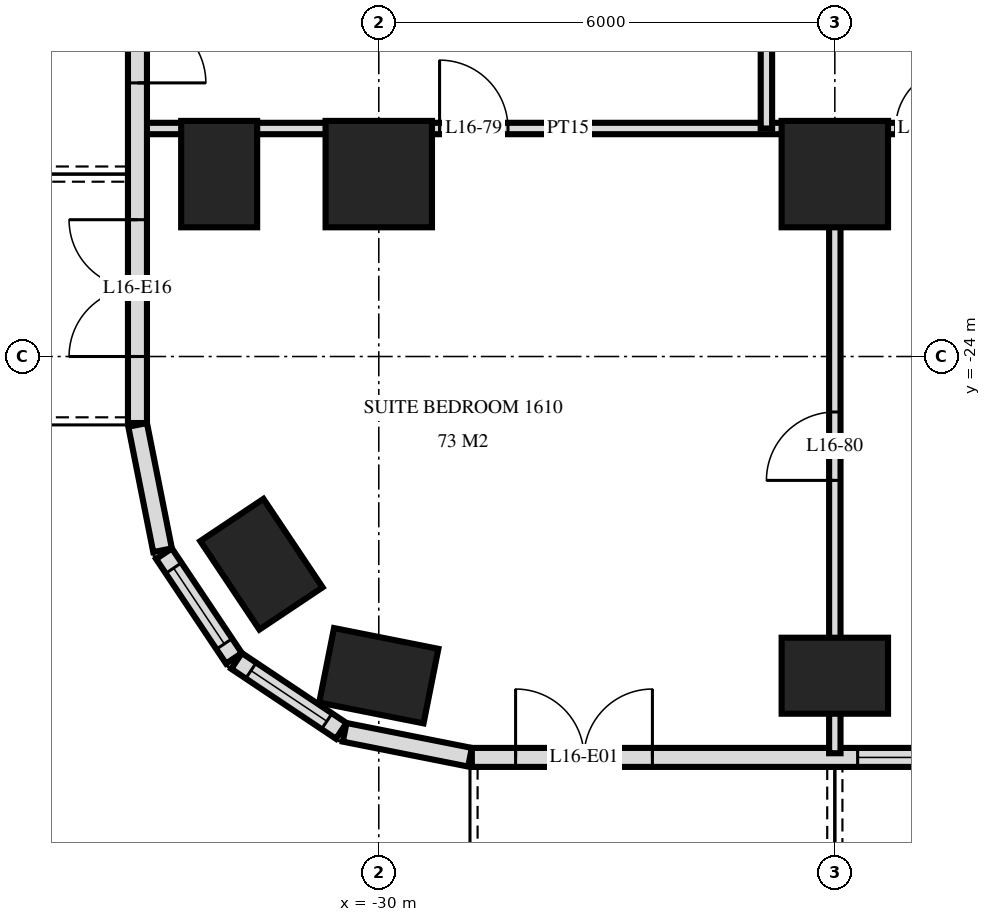
"""IFC4 building model, lengths in metres.
Left out: names, types, materials, properties, quantities, classifications, styles, units other than length and angle.
Written with IfcOpenShell. Run it as: python <this file> out.ifc"""

import sys

from ifc_helpers import new_model, si_unit, direction, frame, frame_2d, origin, origin_2d, place, context, subcontext, project, spatial, rectangle, extrude, element, fill, save


model = new_model("IFC4")
c1 = context("Model", 3, precision=1e-05, world=origin(), true_north=direction((0.0, 1.0)))
c2 = subcontext(c1, "Body", "Model", "MODEL_VIEW")
j1 = project(units=[si_unit("LENGTHUNIT", "METRE"), si_unit("PLANEANGLEUNIT", "RADIAN")], contexts=[c1])
p1 = place(None, origin())
s1 = spatial("IfcSite", under=j1, at=p1, CompositionType="ELEMENT")
p2 = place(p1, origin())
s2 = spatial("IfcBuilding", under=s1, at=p2, CompositionType="ELEMENT")
p3 = place(p2, frame((0.0, 0.0, 67.2)))
s3 = spatial("IfcBuildingStorey", under=s2, at=p3, CompositionType="ELEMENT", Elevation=67.2)
for number, where, z_axis, x_axis in (
    (1, (-32.1, -21.6, 0.0), (0.0, 0.0, 1.0), (0.0, 1.0, 0.0)),
    (2, (-31.544, -26.733, 0.0), (0.0, 0.0, 1.0), (-0.556, 0.831, 0.0)),
    (3, (-30.0, -28.2, 0.0), (0.0, 0.0, 1.0), (-0.981, 0.195, 0.0)),
):
    element("IfcColumn", number, at=place(p3, frame(where, z_axis=z_axis, x_axis=x_axis)), inside=s3, PredefinedType="COLUMN", context=c2, shape_type="SweptSolid", body=[
        extrude(rectangle(XDim=1.4, YDim=1.0, at=origin_2d()), origin(), (0.0, 0.0, 1.0), 3.6),
    ])
p4 = place(p3, frame((-30.0, -21.6, 0.0), z_axis=(0.0, 0.0, 1.0), x_axis=(1.0, 0.0, 0.0)))
e4 = element("IfcColumn", 4, at=p4, inside=s3, PredefinedType="COLUMN", context=c2, shape_type="SweptSolid", body=[
    extrude(rectangle(XDim=1.4, YDim=1.4, at=origin_2d()), origin(), (0.0, 0.0, 1.0), 3.6),
])
p5 = place(p3, frame((-24.0, -28.2, 0.0), z_axis=(0.0, 0.0, 1.0), x_axis=(1.0, 0.0, 0.0)))
e5 = element("IfcColumn", 5, at=p5, inside=s3, PredefinedType="COLUMN", context=c2, shape_type="SweptSolid", body=[
    extrude(rectangle(XDim=1.4, YDim=1.0, at=origin_2d()), origin(), (0.0, 0.0, 1.0), 3.6),
])
p6 = place(p3, frame((-24.0, -21.6, 0.0), z_axis=(0.0, 0.0, 1.0), x_axis=(1.0, 0.0, 0.0)))
e6 = element("IfcColumn", 6, at=p6, inside=s3, PredefinedType="COLUMN", context=c2, shape_type="SweptSolid", body=[
    extrude(rectangle(XDim=1.4, YDim=1.4, at=origin_2d()), origin(), (0.0, 0.0, 1.0), 3.6),
])
p7 = place(p3, frame((-33.175, -3.325, 0.0), z_axis=(0.0, 0.0, 1.0), x_axis=(0.0, -1.0, 0.0)))
e7 = element("IfcWall", 7, at=p7, inside=s3, PredefinedType="SOLIDWALL", context=c2, shape_type="SweptSolid", body=[
    extrude(rectangle(XDim=21.551, YDim=0.25, at=frame_2d((10.775, 0.0))), origin(), (0.0, 0.0, 1.0), 3.32),
])
p8 = place(p7, frame((6.65, 0.0, 0.0)))
e8 = element("IfcOpeningElement", 8, at=p8, cuts=e7, PredefinedType="OPENING", context=c2, shape_type="SweptSolid", body=[
    extrude(rectangle(XDim=1.8, YDim=2.4, at=frame_2d((0.9, 1.2))), frame((0.0, 0.135, 0.0), z_axis=(0.0, -1.0, 0.0), x_axis=(1.0, 0.0, 0.0)), (0.0, 0.0, 1.0), 0.27),
])
p9 = place(p7, frame((12.575, 0.0, 0.3)))
e9 = element("IfcOpeningElement", 9, at=p9, cuts=e7, PredefinedType="OPENING", context=c2, shape_type="SweptSolid", body=[
    extrude(rectangle(XDim=1.2, YDim=2.1, at=frame_2d((0.6, 1.05))), frame((0.0, 0.135, 0.0), z_axis=(0.0, -1.0, 0.0), x_axis=(1.0, 0.0, 0.0)), (0.0, 0.0, 1.0), 0.27),
])
p10 = place(p7, frame((15.275, 0.0, 0.0)))
e10 = element("IfcOpeningElement", 10, at=p10, cuts=e7, PredefinedType="OPENING", context=c2, shape_type="SweptSolid", body=[
    extrude(rectangle(XDim=1.8, YDim=2.4, at=frame_2d((0.9, 1.2))), frame((0.0, 0.135, 0.0), z_axis=(0.0, -1.0, 0.0), x_axis=(1.0, 0.0, 0.0)), (0.0, 0.0, 1.0), 0.27),
])
p11 = place(p7, frame((18.875, 0.0, 0.0)))
e11 = element("IfcOpeningElement", 11, at=p11, cuts=e7, PredefinedType="OPENING", context=c2, shape_type="SweptSolid", body=[
    extrude(rectangle(XDim=1.8, YDim=2.4, at=frame_2d((0.9, 1.2))), frame((0.0, 0.135, 0.0), z_axis=(0.0, -1.0, 0.0), x_axis=(1.0, 0.0, 0.0)), (0.0, 0.0, 1.0), 0.27),
])
p12 = place(p3, frame((-33.173, -24.9, 0.0), z_axis=(0.0, 0.0, 1.0), x_axis=(0.195166572128, -0.980770110232, 0.0)))
e12 = element("IfcWall", 12, at=p12, inside=s3, PredefinedType="SOLIDWALL", context=c2, shape_type="SweptSolid", body=[
    extrude(rectangle(XDim=1.681, YDim=0.25, at=frame_2d((0.841, 0.0))), origin(), (0.0, 0.0, 1.0), 3.32),
])
p13 = place(p3, frame((-32.826, -26.594, 0.0), z_axis=(0.0, 0.0, 1.0), x_axis=(0.55555029066, -0.831482937015, 0.0)))
e13 = element("IfcWall", 13, at=p13, inside=s3, PredefinedType="SOLIDWALL", context=c2, shape_type="SweptSolid", body=[
    extrude(rectangle(XDim=1.656, YDim=0.25, at=frame_2d((0.828, 0.0))), origin(), (0.0, 0.0, 1.0), 3.32),
])
p14 = place(p13, frame((0.228, 0.0, 0.9)))
e14 = element("IfcOpeningElement", 14, at=p14, cuts=e13, PredefinedType="OPENING", context=c2, shape_type="SweptSolid", body=[
    extrude(rectangle(XDim=1.2, YDim=1.5, at=frame_2d((0.6, 0.75))), frame((0.0, 0.135, 0.0), z_axis=(0.0, -1.0, 0.0), x_axis=(1.0, 0.0, 0.0)), (0.0, 0.0, 1.0), 0.27),
])
p15 = place(p3, frame((-31.871, -28.006, 0.0), z_axis=(0.0, 0.0, 1.0), x_axis=(0.831482937015, -0.55555029066, 0.0)))
e15 = element("IfcWall", 15, at=p15, inside=s3, PredefinedType="SOLIDWALL", context=c2, shape_type="SweptSolid", body=[
    extrude(rectangle(XDim=1.656, YDim=0.25, at=frame_2d((0.828, 0.0))), origin(), (0.0, 0.0, 1.0), 3.32),
])
p16 = place(p15, frame((0.228, 0.0, 0.9)))
e16 = element("IfcOpeningElement", 16, at=p16, cuts=e15, PredefinedType="OPENING", context=c2, shape_type="SweptSolid", body=[
    extrude(rectangle(XDim=1.2, YDim=1.5, at=frame_2d((0.6, 0.75))), frame((0.0, 0.135, 0.0), z_axis=(0.0, -1.0, 0.0), x_axis=(1.0, 0.0, 0.0)), (0.0, 0.0, 1.0), 0.27),
])
p17 = place(p3, frame((-30.449, -28.945, 0.0), z_axis=(0.0, 0.0, 1.0), x_axis=(0.980775640221, -0.19513878023, 0.0)))
e17 = element("IfcWall", 17, at=p17, inside=s3, PredefinedType="SOLIDWALL", context=c2, shape_type="SweptSolid", body=[
    extrude(rectangle(XDim=1.681, YDim=0.25, at=frame_2d((0.841, 0.0))), origin(), (0.0, 0.0, 1.0), 3.32),
])
p18 = place(p3, frame((-28.775, -29.275, 0.0), z_axis=(0.0, 0.0, 1.0), x_axis=(1.0, 0.0, 0.0)))
e18 = element("IfcWall", 18, at=p18, inside=s3, PredefinedType="SOLIDWALL", context=c2, shape_type="SweptSolid", body=[
    extrude(rectangle(XDim=57.551, YDim=0.25, at=frame_2d((28.775, 0.0))), origin(), (0.0, 0.0, 1.0), 3.32),
])
p19 = place(p18, frame((0.575, 0.0, 0.0)))
e19 = element("IfcOpeningElement", 19, at=p19, cuts=e18, PredefinedType="OPENING", context=c2, shape_type="SweptSolid", body=[
    extrude(rectangle(XDim=1.8, YDim=2.4, at=frame_2d((0.9, 1.2))), frame((0.0, 0.135, 0.0), z_axis=(0.0, -1.0, 0.0), x_axis=(1.0, 0.0, 0.0)), (0.0, 0.0, 1.0), 0.27),
])
p20 = place(p18, frame((5.075, 0.0, 0.3)))
e20 = element("IfcOpeningElement", 20, at=p20, cuts=e18, PredefinedType="OPENING", context=c2, shape_type="SweptSolid", body=[
    extrude(rectangle(XDim=2.4, YDim=2.1, at=frame_2d((1.2, 1.05))), frame((0.0, 0.135, 0.0), z_axis=(0.0, -1.0, 0.0), x_axis=(1.0, 0.0, 0.0)), (0.0, 0.0, 1.0), 0.27),
])
p21 = place(p18, frame((8.375, 0.0, 0.0)))
e21 = element("IfcOpeningElement", 21, at=p21, cuts=e18, PredefinedType="OPENING", context=c2, shape_type="SweptSolid", body=[
    extrude(rectangle(XDim=1.8, YDim=2.4, at=frame_2d((0.9, 1.2))), frame((0.0, 0.135, 0.0), z_axis=(0.0, -1.0, 0.0), x_axis=(1.0, 0.0, 0.0)), (0.0, 0.0, 1.0), 0.27),
])
p22 = place(p18, frame((11.375, 0.0, 0.0)))
e22 = element("IfcOpeningElement", 22, at=p22, cuts=e18, PredefinedType="OPENING", context=c2, shape_type="SweptSolid", body=[
    extrude(rectangle(XDim=1.8, YDim=2.4, at=frame_2d((0.9, 1.2))), frame((0.0, 0.135, 0.0), z_axis=(0.0, -1.0, 0.0), x_axis=(1.0, 0.0, 0.0)), (0.0, 0.0, 1.0), 0.27),
])
p23 = place(p18, frame((14.075, 0.0, 0.3)))
e23 = element("IfcOpeningElement", 23, at=p23, cuts=e18, PredefinedType="OPENING", context=c2, shape_type="SweptSolid", body=[
    extrude(rectangle(XDim=2.4, YDim=2.1, at=frame_2d((1.2, 1.05))), frame((0.0, 0.135, 0.0), z_axis=(0.0, -1.0, 0.0), x_axis=(1.0, 0.0, 0.0)), (0.0, 0.0, 1.0), 0.27),
])
p24 = place(p18, frame((17.375, 0.0, 0.0)))
e24 = element("IfcOpeningElement", 24, at=p24, cuts=e18, PredefinedType="OPENING", context=c2, shape_type="SweptSolid", body=[
    extrude(rectangle(XDim=1.8, YDim=2.4, at=frame_2d((0.9, 1.2))), frame((0.0, 0.135, 0.0), z_axis=(0.0, -1.0, 0.0), x_axis=(1.0, 0.0, 0.0)), (0.0, 0.0, 1.0), 0.27),
])
p25 = place(p18, frame((20.075, 0.0, 0.3)))
e25 = element("IfcOpeningElement", 25, at=p25, cuts=e18, PredefinedType="OPENING", context=c2, shape_type="SweptSolid", body=[
    extrude(rectangle(XDim=2.4, YDim=2.1, at=frame_2d((1.2, 1.05))), frame((0.0, 0.135, 0.0), z_axis=(0.0, -1.0, 0.0), x_axis=(1.0, 0.0, 0.0)), (0.0, 0.0, 1.0), 0.27),
])
p26 = place(p18, frame((23.075, 0.0, 0.3)))
e26 = element("IfcOpeningElement", 26, at=p26, cuts=e18, PredefinedType="OPENING", context=c2, shape_type="SweptSolid", body=[
    extrude(rectangle(XDim=2.4, YDim=2.1, at=frame_2d((1.2, 1.05))), frame((0.0, 0.135, 0.0), z_axis=(0.0, -1.0, 0.0), x_axis=(1.0, 0.0, 0.0)), (0.0, 0.0, 1.0), 0.27),
])
p27 = place(p18, frame((26.375, 0.0, 0.0)))
e27 = element("IfcOpeningElement", 27, at=p27, cuts=e18, PredefinedType="OPENING", context=c2, shape_type="SweptSolid", body=[
    extrude(rectangle(XDim=1.8, YDim=2.4, at=frame_2d((0.9, 1.2))), frame((0.0, 0.135, 0.0), z_axis=(0.0, -1.0, 0.0), x_axis=(1.0, 0.0, 0.0)), (0.0, 0.0, 1.0), 0.27),
])
p28 = place(p18, frame((29.375, 0.0, 0.0)))
e28 = element("IfcOpeningElement", 28, at=p28, cuts=e18, PredefinedType="OPENING", context=c2, shape_type="SweptSolid", body=[
    extrude(rectangle(XDim=1.8, YDim=2.4, at=frame_2d((0.9, 1.2))), frame((0.0, 0.135, 0.0), z_axis=(0.0, -1.0, 0.0), x_axis=(1.0, 0.0, 0.0)), (0.0, 0.0, 1.0), 0.27),
])
p29 = place(p18, frame((32.075, 0.0, 0.3)))
e29 = element("IfcOpeningElement", 29, at=p29, cuts=e18, PredefinedType="OPENING", context=c2, shape_type="SweptSolid", body=[
    extrude(rectangle(XDim=2.4, YDim=2.1, at=frame_2d((1.2, 1.05))), frame((0.0, 0.135, 0.0), z_axis=(0.0, -1.0, 0.0), x_axis=(1.0, 0.0, 0.0)), (0.0, 0.0, 1.0), 0.27),
])
p30 = place(p18, frame((35.375, 0.0, 0.0)))
e30 = element("IfcOpeningElement", 30, at=p30, cuts=e18, PredefinedType="OPENING", context=c2, shape_type="SweptSolid", body=[
    extrude(rectangle(XDim=1.8, YDim=2.4, at=frame_2d((0.9, 1.2))), frame((0.0, 0.135, 0.0), z_axis=(0.0, -1.0, 0.0), x_axis=(1.0, 0.0, 0.0)), (0.0, 0.0, 1.0), 0.27),
])
p31 = place(p18, frame((38.075, 0.0, 0.3)))
e31 = element("IfcOpeningElement", 31, at=p31, cuts=e18, PredefinedType="OPENING", context=c2, shape_type="SweptSolid", body=[
    extrude(rectangle(XDim=2.4, YDim=2.1, at=frame_2d((1.2, 1.05))), frame((0.0, 0.135, 0.0), z_axis=(0.0, -1.0, 0.0), x_axis=(1.0, 0.0, 0.0)), (0.0, 0.0, 1.0), 0.27),
])
p32 = place(p18, frame((41.075, 0.0, 0.3)))
e32 = element("IfcOpeningElement", 32, at=p32, cuts=e18, PredefinedType="OPENING", context=c2, shape_type="SweptSolid", body=[
    extrude(rectangle(XDim=2.4, YDim=2.1, at=frame_2d((1.2, 1.05))), frame((0.0, 0.135, 0.0), z_axis=(0.0, -1.0, 0.0), x_axis=(1.0, 0.0, 0.0)), (0.0, 0.0, 1.0), 0.27),
])
p33 = place(p18, frame((44.375, 0.0, 0.0)))
e33 = element("IfcOpeningElement", 33, at=p33, cuts=e18, PredefinedType="OPENING", context=c2, shape_type="SweptSolid", body=[
    extrude(rectangle(XDim=1.8, YDim=2.4, at=frame_2d((0.9, 1.2))), frame((0.0, 0.135, 0.0), z_axis=(0.0, -1.0, 0.0), x_axis=(1.0, 0.0, 0.0)), (0.0, 0.0, 1.0), 0.27),
])
p34 = place(p18, frame((47.075, 0.0, 0.3)))
e34 = element("IfcOpeningElement", 34, at=p34, cuts=e18, PredefinedType="OPENING", context=c2, shape_type="SweptSolid", body=[
    extrude(rectangle(XDim=2.4, YDim=2.1, at=frame_2d((1.2, 1.05))), frame((0.0, 0.135, 0.0), z_axis=(0.0, -1.0, 0.0), x_axis=(1.0, 0.0, 0.0)), (0.0, 0.0, 1.0), 0.27),
])
p35 = place(p18, frame((50.375, 0.0, 0.0)))
e35 = element("IfcOpeningElement", 35, at=p35, cuts=e18, PredefinedType="OPENING", context=c2, shape_type="SweptSolid", body=[
    extrude(rectangle(XDim=1.8, YDim=2.4, at=frame_2d((0.9, 1.2))), frame((0.0, 0.135, 0.0), z_axis=(0.0, -1.0, 0.0), x_axis=(1.0, 0.0, 0.0)), (0.0, 0.0, 1.0), 0.27),
])
p36 = place(p18, frame((53.375, 0.0, 0.0)))
e36 = element("IfcOpeningElement", 36, at=p36, cuts=e18, PredefinedType="OPENING", context=c2, shape_type="SweptSolid", body=[
    extrude(rectangle(XDim=1.8, YDim=2.4, at=frame_2d((0.9, 1.2))), frame((0.0, 0.135, 0.0), z_axis=(0.0, -1.0, 0.0), x_axis=(1.0, 0.0, 0.0)), (0.0, 0.0, 1.0), 0.27),
])
p37 = place(p3, frame((-24.0, -29.22, 0.0), z_axis=(0.0, 0.0, 1.0), x_axis=(0.0, 1.0, 0.0)))
e37 = element("IfcWall", 37, at=p37, inside=s3, PredefinedType="PARTITIONING", context=c2, shape_type="SweptSolid", body=[
    extrude(rectangle(XDim=8.22, YDim=0.15, at=frame_2d((4.11, 0.0))), origin(), (0.0, 0.0, 1.0), 3.32),
])
p38 = place(p37, frame((3.59, 0.0, 0.0)))
e38 = element("IfcOpeningElement", 38, at=p38, cuts=e37, PredefinedType="OPENING", context=c2, shape_type="SweptSolid", body=[
    extrude(rectangle(XDim=0.9, YDim=2.1, at=frame_2d((0.45, 1.05))), frame((0.0, 0.085, 0.0), z_axis=(0.0, -1.0, 0.0), x_axis=(1.0, 0.0, 0.0)), (0.0, 0.0, 1.0), 0.17),
])
p39 = place(p3, frame((-24.9, -21.0, 0.0), z_axis=(0.0, 0.0, 1.0), x_axis=(0.0, 1.0, 0.0)))
e39 = element("IfcWall", 39, at=p39, inside=s3, PredefinedType="PARTITIONING", context=c2, shape_type="SweptSolid", body=[
    extrude(rectangle(XDim=3.0, YDim=0.15, at=frame_2d((1.5, 0.0))), origin(), (0.0, 0.0, 1.0), 3.32),
])
p40 = place(p3, frame((-33.12, -21.0, 0.0), z_axis=(0.0, 0.0, 1.0), x_axis=(1.0, 0.0, 0.0)))
e40 = element("IfcWall", 40, at=p40, inside=s3, PredefinedType="PARTITIONING", context=c2, shape_type="SweptSolid", body=[
    extrude(rectangle(XDim=11.22, YDim=0.15, at=frame_2d((5.61, 0.0))), origin(), (0.0, 0.0, 1.0), 3.32),
])
p41 = place(p40, frame((9.92, 0.0, 0.0)))
e41 = element("IfcOpeningElement", 41, at=p41, cuts=e40, PredefinedType="OPENING", context=c2, shape_type="SweptSolid", body=[
    extrude(rectangle(XDim=0.8, YDim=2.1, at=frame_2d((0.4, 1.05))), frame((0.0, 0.085, 0.0), z_axis=(0.0, -1.0, 0.0), x_axis=(1.0, 0.0, 0.0)), (0.0, 0.0, 1.0), 0.17),
])
p42 = place(p40, frame((3.92, 0.0, 0.0)))
e42 = element("IfcOpeningElement", 42, at=p42, cuts=e40, PredefinedType="OPENING", context=c2, shape_type="SweptSolid", body=[
    extrude(rectangle(XDim=0.9, YDim=2.1, at=frame_2d((0.45, 1.05))), frame((0.0, 0.085, 0.0), z_axis=(0.0, -1.0, 0.0), x_axis=(1.0, 0.0, 0.0)), (0.0, 0.0, 1.0), 0.17),
])
p43 = place(p14, origin())
e43 = element("IfcWindow", 43, at=p43, inside=s3, PartitioningType="SINGLE_PANEL", PredefinedType="WINDOW", context=c2, shape_type="SweptSolid", body=[
    extrude(rectangle(XDim=1.2, YDim=1.5, at=frame_2d((0.6, 0.75))), frame((0.0, 0.03, 0.0), z_axis=(0.0, -1.0, 0.0), x_axis=(1.0, 0.0, 0.0)), (0.0, 0.0, 1.0), 0.06),
])
fill(e14, e43)
p44 = place(p16, origin())
e44 = element("IfcWindow", 44, at=p44, inside=s3, PartitioningType="SINGLE_PANEL", PredefinedType="WINDOW", context=c2, shape_type="SweptSolid", body=[
    extrude(rectangle(XDim=1.2, YDim=1.5, at=frame_2d((0.6, 0.75))), frame((0.0, 0.03, 0.0), z_axis=(0.0, -1.0, 0.0), x_axis=(1.0, 0.0, 0.0)), (0.0, 0.0, 1.0), 0.06),
])
fill(e16, e44)
p45 = place(p19, origin())
e45 = element("IfcDoor", 45, at=p45, inside=s3, OperationType="DOUBLE_DOOR_SINGLE_SWING", PredefinedType="DOOR", context=c2, shape_type="SweptSolid", body=[
    extrude(rectangle(XDim=1.8, YDim=2.4, at=frame_2d((0.9, 1.2))), frame((0.0, 0.025, 0.0), z_axis=(0.0, -1.0, 0.0), x_axis=(1.0, 0.0, 0.0)), (0.0, 0.0, 1.0), 0.05),
])
fill(e19, e45)
p46 = place(p20, origin())
e46 = element("IfcWindow", 46, at=p46, inside=s3, PartitioningType="SINGLE_PANEL", PredefinedType="WINDOW", context=c2, shape_type="SweptSolid", body=[
    extrude(rectangle(XDim=2.4, YDim=2.1, at=frame_2d((1.2, 1.05))), frame((0.0, 0.03, 0.0), z_axis=(0.0, -1.0, 0.0), x_axis=(1.0, 0.0, 0.0)), (0.0, 0.0, 1.0), 0.06),
])
fill(e20, e46)
p47 = place(p10, origin())
e47 = element("IfcDoor", 47, at=p47, inside=s3, OperationType="DOUBLE_DOOR_SINGLE_SWING", PredefinedType="DOOR", context=c2, shape_type="SweptSolid", body=[
    extrude(rectangle(XDim=1.8, YDim=2.4, at=frame_2d((0.9, 1.2))), frame((0.0, 0.025, 0.0), z_axis=(0.0, -1.0, 0.0), x_axis=(1.0, 0.0, 0.0)), (0.0, 0.0, 1.0), 0.05),
])
fill(e10, e47)
p48 = place(p11, frame((0.9, 0.0, 0.0), z_axis=(0.0, 0.0, 1.0), x_axis=(-1.0, 0.0, 0.0)))
e48 = element("IfcDoor", 48, at=p48, inside=s3, OperationType="DOUBLE_DOOR_SINGLE_SWING", PredefinedType="DOOR", context=c2, shape_type="SweptSolid", body=[
    extrude(rectangle(XDim=1.8, YDim=2.4, at=frame_2d((0.0, 1.2))), frame((0.0, -0.025, 0.0), z_axis=(0.0, 1.0, 0.0), x_axis=(-1.0, 0.0, 0.0)), (0.0, 0.0, 1.0), 0.05),
])
fill(e11, e48)
p49 = place(p41, origin())
e49 = element("IfcDoor", 49, at=p49, inside=s3, OperationType="SINGLE_SWING_LEFT", PredefinedType="DOOR", context=c2, shape_type="SweptSolid", body=[
    extrude(rectangle(XDim=0.8, YDim=2.1, at=frame_2d((0.4, 1.05))), frame((0.0, 0.025, 0.0), z_axis=(0.0, -1.0, 0.0), x_axis=(1.0, 0.0, 0.0)), (0.0, 0.0, 1.0), 0.05),
])
fill(e41, e49)
p50 = place(p42, origin())
e50 = element("IfcDoor", 50, at=p50, inside=s3, OperationType="SINGLE_SWING_RIGHT", PredefinedType="DOOR", context=c2, shape_type="SweptSolid", body=[
    extrude(rectangle(XDim=0.9, YDim=2.1, at=frame_2d((0.45, 1.05))), frame((0.0, 0.025, 0.0), z_axis=(0.0, -1.0, 0.0), x_axis=(1.0, 0.0, 0.0)), (0.0, 0.0, 1.0), 0.05),
])
fill(e42, e50)
p51 = place(p38, origin())
e51 = element("IfcDoor", 51, at=p51, inside=s3, OperationType="SINGLE_SWING_RIGHT", PredefinedType="DOOR", context=c2, shape_type="SweptSolid", body=[
    extrude(rectangle(XDim=0.9, YDim=2.1, at=frame_2d((0.45, 1.05))), frame((0.0, 0.025, 0.0), z_axis=(0.0, -1.0, 0.0), x_axis=(1.0, 0.0, 0.0)), (0.0, 0.0, 1.0), 0.05),
])
fill(e38, e51)
save(model, sys.argv[1])
